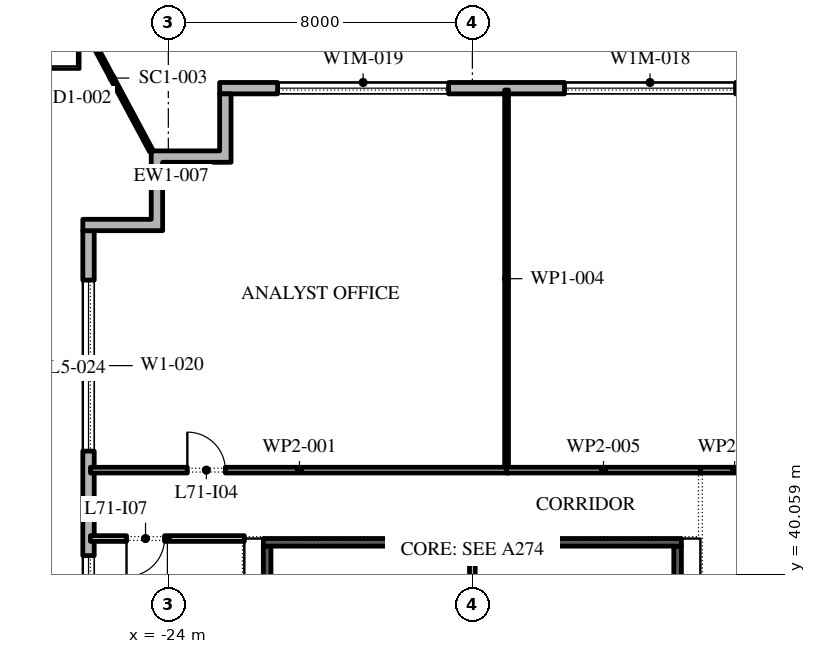
"""IFC4 building model, lengths in metres.
Left out: names, types, materials, properties, quantities, classifications, styles, units other than length and angle.
Written with IfcOpenShell. Run it as: python <this file> out.ifc"""

import sys

from ifc_helpers import new_model, si_unit, direction, frame, frame_2d, origin, place, context, subcontext, project, spatial, polyline, rectangle, outline, extrude, element, fill, save


model = new_model("IFC4")
c1 = context("Model", 3, precision=1e-05, world=origin(), true_north=direction((0.0, 1.0)))
c2 = subcontext(c1, "Body", "Model", "MODEL_VIEW")
j1 = project(units=[si_unit("LENGTHUNIT", "METRE"), si_unit("PLANEANGLEUNIT", "RADIAN")], contexts=[c1])
p1 = place(None, origin())
s1 = spatial("IfcSite", under=j1, at=p1, CompositionType="ELEMENT")
p2 = place(p1, origin())
s2 = spatial("IfcBuilding", under=s1, at=p2, CompositionType="ELEMENT")
p3 = place(p2, frame((0.0, 0.0, 325.8)))
s3 = spatial("IfcBuildingStorey", under=s2, at=p3, CompositionType="ELEMENT", Elevation=325.8)
p4 = place(p3, frame((22.35, 52.85, 0.0), z_axis=(0.0, 0.0, 1.0), x_axis=(-1.0, 0.0, 0.0)))
e1 = element("IfcWall", 1, at=p4, inside=s3, PredefinedType="STANDARD", context=c2, shape_type="SweptSolid", body=[
    extrude(rectangle(XDim=45.0, YDim=0.3, at=frame_2d((22.5, 0.0))), origin(), (0.0, 0.0, 1.0), 4.0),
])
p5 = place(p4, frame((1.375, 0.0, 0.45)))
e2 = element("IfcOpeningElement", 2, at=p5, cuts=e1, PredefinedType="OPENING", context=c2, shape_type="SweptSolid", body=[
    extrude(rectangle(XDim=4.5, YDim=2.575, at=frame_2d((2.25, 1.288))), frame((0.0, 0.16, 0.0), z_axis=(0.0, -1.0, 0.0), x_axis=(1.0, 0.0, 0.0)), (0.0, 0.0, 1.0), 0.32),
])
p6 = place(p4, frame((8.775, 0.0, 0.45)))
e3 = element("IfcOpeningElement", 3, at=p6, cuts=e1, PredefinedType="OPENING", context=c2, shape_type="SweptSolid", body=[
    extrude(rectangle(XDim=4.5, YDim=2.575, at=frame_2d((2.25, 1.288))), frame((0.0, 0.16, 0.0), z_axis=(0.0, -1.0, 0.0), x_axis=(1.0, 0.0, 0.0)), (0.0, 0.0, 1.0), 0.32),
])
p7 = place(p4, frame((17.375, 0.0, 0.0)))
e4 = element("IfcOpeningElement", 4, at=p7, cuts=e1, PredefinedType="OPENING", context=c2, shape_type="SweptSolid", body=[
    extrude(rectangle(XDim=2.4, YDim=3.025, at=frame_2d((1.2, 1.512))), frame((0.0, 0.16, 0.0), z_axis=(0.0, -1.0, 0.0), x_axis=(1.0, 0.0, 0.0)), (0.0, 0.0, 1.0), 0.32),
])
p8 = place(p4, frame((23.875, 0.0, 0.45)))
e5 = element("IfcOpeningElement", 5, at=p8, cuts=e1, PredefinedType="OPENING", context=c2, shape_type="SweptSolid", body=[
    extrude(rectangle(XDim=4.5, YDim=2.575, at=frame_2d((2.25, 1.288))), frame((0.0, 0.16, 0.0), z_axis=(0.0, -1.0, 0.0), x_axis=(1.0, 0.0, 0.0)), (0.0, 0.0, 1.0), 0.32),
])
p9 = place(p4, frame((31.425, 0.0, 0.45)))
e6 = element("IfcOpeningElement", 6, at=p9, cuts=e1, PredefinedType="OPENING", context=c2, shape_type="SweptSolid", body=[
    extrude(rectangle(XDim=4.5, YDim=2.575, at=frame_2d((2.25, 1.288))), frame((0.0, 0.16, 0.0), z_axis=(0.0, -1.0, 0.0), x_axis=(1.0, 0.0, 0.0)), (0.0, 0.0, 1.0), 0.32),
])
p10 = place(p4, frame((38.975, 0.0, 0.45)))
e7 = element("IfcOpeningElement", 7, at=p10, cuts=e1, PredefinedType="OPENING", context=c2, shape_type="SweptSolid", body=[
    extrude(rectangle(XDim=4.5, YDim=2.575, at=frame_2d((2.25, 1.288))), frame((0.0, 0.16, 0.0), z_axis=(0.0, -1.0, 0.0), x_axis=(1.0, 0.0, 0.0)), (0.0, 0.0, 1.0), 0.32),
])
p11 = place(p3, frame((-26.1, 49.1, 0.0), z_axis=(0.0, 0.0, 1.0), x_axis=(0.0, -1.0, 0.0)))
e8 = element("IfcWall", 8, at=p11, inside=s3, PredefinedType="STANDARD", context=c2, shape_type="SweptSolid", body=[
    extrude(rectangle(XDim=51.5, YDim=0.3, at=frame_2d((25.75, 0.0))), origin(), (0.0, 0.0, 1.0), 4.0),
])
p12 = place(p11, frame((1.3, 0.0, 0.45)))
e9 = element("IfcOpeningElement", 9, at=p12, cuts=e8, PredefinedType="OPENING", context=c2, shape_type="SweptSolid", body=[
    extrude(rectangle(XDim=4.5, YDim=3.05, at=frame_2d((2.25, 1.525))), frame((0.0, 0.16, 0.0), z_axis=(0.0, -1.0, 0.0), x_axis=(1.0, 0.0, 0.0)), (0.0, 0.0, 1.0), 0.32),
])
p13 = place(p11, frame((8.55, 0.0, 0.45)))
e10 = element("IfcOpeningElement", 10, at=p13, cuts=e8, PredefinedType="OPENING", context=c2, shape_type="SweptSolid", body=[
    extrude(rectangle(XDim=4.5, YDim=3.05, at=frame_2d((2.25, 1.525))), frame((0.0, 0.16, 0.0), z_axis=(0.0, -1.0, 0.0), x_axis=(1.0, 0.0, 0.0)), (0.0, 0.0, 1.0), 0.32),
])
p14 = place(p11, frame((17.0, 0.0, 0.0)))
e11 = element("IfcOpeningElement", 11, at=p14, cuts=e8, PredefinedType="OPENING", context=c2, shape_type="SweptSolid", body=[
    extrude(rectangle(XDim=2.4, YDim=3.5, at=frame_2d((1.2, 1.75))), frame((0.0, 0.16, 0.0), z_axis=(0.0, -1.0, 0.0), x_axis=(1.0, 0.0, 0.0)), (0.0, 0.0, 1.0), 0.32),
])
p15 = place(p11, frame((23.35, 0.0, 0.45)))
e12 = element("IfcOpeningElement", 12, at=p15, cuts=e8, PredefinedType="OPENING", context=c2, shape_type="SweptSolid", body=[
    extrude(rectangle(XDim=4.5, YDim=3.05, at=frame_2d((2.25, 1.525))), frame((0.0, 0.16, 0.0), z_axis=(0.0, -1.0, 0.0), x_axis=(1.0, 0.0, 0.0)), (0.0, 0.0, 1.0), 0.32),
])
p16 = place(p11, frame((30.75, 0.0, 0.45)))
e13 = element("IfcOpeningElement", 13, at=p16, cuts=e8, PredefinedType="OPENING", context=c2, shape_type="SweptSolid", body=[
    extrude(rectangle(XDim=4.5, YDim=3.05, at=frame_2d((2.25, 1.525))), frame((0.0, 0.16, 0.0), z_axis=(0.0, -1.0, 0.0), x_axis=(1.0, 0.0, 0.0)), (0.0, 0.0, 1.0), 0.32),
])
p17 = place(p11, frame((38.15, 0.0, 0.45)))
e14 = element("IfcOpeningElement", 14, at=p17, cuts=e8, PredefinedType="OPENING", context=c2, shape_type="SweptSolid", body=[
    extrude(rectangle(XDim=4.5, YDim=3.05, at=frame_2d((2.25, 1.525))), frame((0.0, 0.16, 0.0), z_axis=(0.0, -1.0, 0.0), x_axis=(1.0, 0.0, 0.0)), (0.0, 0.0, 1.0), 0.32),
])
p18 = place(p11, frame((46.6, 0.0, 0.0)))
e15 = element("IfcOpeningElement", 15, at=p18, cuts=e8, PredefinedType="OPENING", context=c2, shape_type="SweptSolid", body=[
    extrude(rectangle(XDim=2.4, YDim=3.5, at=frame_2d((1.2, 1.75))), frame((0.0, 0.16, 0.0), z_axis=(0.0, -1.0, 0.0), x_axis=(1.0, 0.0, 0.0)), (0.0, 0.0, 1.0), 0.32),
])
p19 = place(p3, origin())
e16 = element("IfcWall", 16, at=p19, inside=s3, PredefinedType="STANDARD", context=c2, shape_type="SweptSolid", body=[
    extrude(outline(polyline([(-24.45, 49.4), (-24.45, 51.2), (-22.65, 51.2), (-22.65, 52.7), (-22.35, 52.7), (-22.35, 50.9), (-24.15, 50.9), (-24.15, 49.1), (-26.25, 49.1), (-26.25, 49.4), (-24.45, 49.4)])), origin(), (0.0, 0.0, 1.0), 4.0),
])
p20 = place(p3, frame((-24.45, 51.2, -0.05), z_axis=(0.0, 0.0, 1.0), x_axis=(-0.472807073277, 0.881165972709, 0.0)))
e17 = element("IfcWall", 17, at=p20, inside=s3, PredefinedType="STANDARD", context=c2, shape_type="SweptSolid", body=[
    extrude(rectangle(XDim=4.349, YDim=0.1, at=frame_2d((2.174, 0.0))), origin(), (0.0, 0.0, 1.0), 4.05),
])
p21 = place(p3, frame((-21.4, 25.75, 0.0), z_axis=(0.0, 0.0, 1.0), x_axis=(0.0, 1.0, 0.0)))
e18 = element("IfcWall", 18, at=p21, inside=s3, PredefinedType="SHEAR", context=c2, shape_type="SweptSolid", body=[
    extrude(rectangle(XDim=15.05, YDim=0.2, at=frame_2d((7.525, 0.0))), origin(), (0.0, 0.0, 1.0), 4.0),
])
p22 = place(p21, frame((7.075, 0.0, 0.0)))
e19 = element("IfcOpeningElement", 19, at=p22, cuts=e18, PredefinedType="OPENING", context=c2, shape_type="SweptSolid", body=[
    extrude(rectangle(XDim=0.9, YDim=2.1, at=frame_2d((0.45, 1.05))), frame((0.0, 0.11, 0.0), z_axis=(0.0, -1.0, 0.0), x_axis=(1.0, 0.0, 0.0)), (0.0, 0.0, 1.0), 0.22),
])
p23 = place(p3, frame((-10.6, 25.75, 0.0), z_axis=(0.0, 0.0, 1.0), x_axis=(0.0, 1.0, 0.0)))
e20 = element("IfcWall", 20, at=p23, inside=s3, PredefinedType="SHEAR", context=c2, shape_type="SweptSolid", body=[
    extrude(rectangle(XDim=15.05, YDim=0.2, at=frame_2d((7.525, 0.0))), origin(), (0.0, 0.0, 1.0), 4.0),
])
p24 = place(p23, frame((7.075, 0.0, 0.0)))
e21 = element("IfcOpeningElement", 21, at=p24, cuts=e20, PredefinedType="OPENING", context=c2, shape_type="SweptSolid", body=[
    extrude(rectangle(XDim=0.9, YDim=2.1, at=frame_2d((0.45, 1.05))), frame((0.0, 0.11, 0.0), z_axis=(0.0, -1.0, 0.0), x_axis=(1.0, 0.0, 0.0)), (0.0, 0.0, 1.0), 0.22),
])
p25 = place(p3, frame((-21.5, 40.9, 0.0), z_axis=(0.0, 0.0, 1.0), x_axis=(1.0, 0.0, 0.0)))
e22 = element("IfcWall", 22, at=p25, inside=s3, PredefinedType="SHEAR", context=c2, shape_type="SweptSolid", body=[
    extrude(rectangle(XDim=11.0, YDim=0.2, at=frame_2d((5.5, 0.0))), origin(), (0.0, 0.0, 1.0), 4.0),
])
p26 = place(p3, frame((-16.0, 25.75, 0.0), z_axis=(0.0, 0.0, 1.0), x_axis=(0.0, 1.0, 0.0)))
e23 = element("IfcWall", 23, at=p26, inside=s3, PredefinedType="PARTITIONING", context=c2, shape_type="SweptSolid", body=[
    extrude(rectangle(XDim=15.05, YDim=0.15, at=frame_2d((7.525, 0.0))), origin(), (0.0, 0.0, 1.0), 4.0),
])
p27 = place(p3, frame((-26.05, 42.8, 0.0), z_axis=(0.0, 0.0, 1.0), x_axis=(1.0, 0.0, 0.0)))
e24 = element("IfcWall", 24, at=p27, inside=s3, PredefinedType="PARTITIONING", context=c2, shape_type="SweptSolid", body=[
    extrude(rectangle(XDim=11.0, YDim=0.15, at=frame_2d((5.5, 0.0))), origin(), (0.0, 0.0, 1.0), 4.0),
])
p28 = place(p27, frame((2.55, 0.0, 0.0)))
e25 = element("IfcOpeningElement", 25, at=p28, cuts=e24, PredefinedType="OPENING", context=c2, shape_type="SweptSolid", body=[
    extrude(rectangle(XDim=1.0, YDim=2.1, at=frame_2d((0.5, 1.05))), frame((0.0, 0.085, 0.0), z_axis=(0.0, -1.0, 0.0), x_axis=(1.0, 0.0, 0.0)), (0.0, 0.0, 1.0), 0.17),
])
p29 = place(p3, frame((-22.0, 41.0, 0.0), z_axis=(0.0, 0.0, 1.0), x_axis=(-1.0, 0.0, 0.0)))
e26 = element("IfcWall", 26, at=p29, inside=s3, PredefinedType="PARTITIONING", context=c2, shape_type="SweptSolid", body=[
    extrude(rectangle(XDim=4.05, YDim=0.15, at=frame_2d((2.025, 0.0))), origin(), (0.0, 0.0, 1.0), 4.0),
])
p30 = place(p29, frame((2.1, 0.0, 0.0)))
e27 = element("IfcOpeningElement", 27, at=p30, cuts=e26, PredefinedType="OPENING", context=c2, shape_type="SweptSolid", body=[
    extrude(rectangle(XDim=1.0, YDim=2.1, at=frame_2d((0.5, 1.05))), frame((0.0, 0.085, 0.0), z_axis=(0.0, -1.0, 0.0), x_axis=(1.0, 0.0, 0.0)), (0.0, 0.0, 1.0), 0.17),
])
p31 = place(p3, frame((-15.1, 42.875, 0.0), z_axis=(0.0, 0.0, 1.0), x_axis=(0.0, 1.0, 0.0)))
e28 = element("IfcWall", 28, at=p31, inside=s3, PredefinedType="PARTITIONING", context=c2, shape_type="SweptSolid", body=[
    extrude(rectangle(XDim=9.925, YDim=0.1, at=frame_2d((4.962, 0.0))), origin(), (0.0, 0.0, 1.0), 4.0),
])
p32 = place(p3, frame((-15.1, 42.8, 0.0), z_axis=(0.0, 0.0, 1.0), x_axis=(1.0, 0.0, 0.0)))
e29 = element("IfcWall", 29, at=p32, inside=s3, PredefinedType="PARTITIONING", context=c2, shape_type="SweptSolid", body=[
    extrude(rectangle(XDim=5.1, YDim=0.15, at=frame_2d((2.55, 0.0))), origin(), (0.0, 0.0, 1.0), 4.0),
])
p33 = place(p3, frame((-10.0, 42.8, 0.0), z_axis=(0.0, 0.0, 1.0), x_axis=(1.0, 0.0, 0.0)))
e30 = element("IfcWall", 30, at=p33, inside=s3, PredefinedType="PARTITIONING", context=c2, shape_type="SweptSolid", body=[
    extrude(rectangle(XDim=1.8, YDim=0.15, at=frame_2d((0.9, 0.0))), origin(), (0.0, 0.0, 1.0), 4.0),
])
p34 = place(p9, origin())
e31 = element("IfcWindow", 31, at=p34, inside=s3, PartitioningType="DOUBLE_PANEL_VERTICAL", PredefinedType="WINDOW", context=c2, shape_type="SweptSolid", body=[
    extrude(rectangle(XDim=4.5, YDim=2.575, at=frame_2d((2.25, 1.288))), frame((0.0, 0.03, 0.0), z_axis=(0.0, -1.0, 0.0), x_axis=(1.0, 0.0, 0.0)), (0.0, 0.0, 1.0), 0.06),
])
fill(e6, e31)
p35 = place(p10, origin())
e32 = element("IfcWindow", 32, at=p35, inside=s3, PartitioningType="DOUBLE_PANEL_VERTICAL", PredefinedType="WINDOW", context=c2, shape_type="SweptSolid", body=[
    extrude(rectangle(XDim=4.5, YDim=2.575, at=frame_2d((2.25, 1.288))), frame((0.0, 0.03, 0.0), z_axis=(0.0, -1.0, 0.0), x_axis=(1.0, 0.0, 0.0)), (0.0, 0.0, 1.0), 0.06),
])
fill(e7, e32)
p36 = place(p12, origin())
e33 = element("IfcWindow", 33, at=p36, inside=s3, PartitioningType="DOUBLE_PANEL_VERTICAL", PredefinedType="WINDOW", context=c2, shape_type="SweptSolid", body=[
    extrude(rectangle(XDim=4.5, YDim=3.05, at=frame_2d((2.25, 1.525))), frame((0.0, 0.03, 0.0), z_axis=(0.0, -1.0, 0.0), x_axis=(1.0, 0.0, 0.0)), (0.0, 0.0, 1.0), 0.06),
])
fill(e9, e33)
p37 = place(p13, origin())
e34 = element("IfcWindow", 34, at=p37, inside=s3, PartitioningType="DOUBLE_PANEL_VERTICAL", PredefinedType="WINDOW", context=c2, shape_type="SweptSolid", body=[
    extrude(rectangle(XDim=4.5, YDim=3.05, at=frame_2d((2.25, 1.525))), frame((0.0, 0.03, 0.0), z_axis=(0.0, -1.0, 0.0), x_axis=(1.0, 0.0, 0.0)), (0.0, 0.0, 1.0), 0.06),
])
fill(e10, e34)
p38 = place(p28, origin())
e35 = element("IfcDoor", 35, at=p38, inside=s3, OperationType="SINGLE_SWING_RIGHT", PredefinedType="DOOR", context=c2, shape_type="SweptSolid", body=[
    extrude(rectangle(XDim=1.0, YDim=2.1, at=frame_2d((0.5, 1.05))), frame((0.0, 0.025, 0.0), z_axis=(0.0, -1.0, 0.0), x_axis=(1.0, 0.0, 0.0)), (0.0, 0.0, 1.0), 0.05),
])
fill(e25, e35)
p39 = place(p30, origin())
e36 = element("IfcDoor", 36, at=p39, inside=s3, OperationType="SINGLE_SWING_LEFT", PredefinedType="DOOR", context=c2, shape_type="SweptSolid", body=[
    extrude(rectangle(XDim=1.0, YDim=2.1, at=frame_2d((0.5, 1.05))), frame((0.0, 0.025, 0.0), z_axis=(0.0, -1.0, 0.0), x_axis=(1.0, 0.0, 0.0)), (0.0, 0.0, 1.0), 0.05),
])
fill(e27, e36)
save(model, sys.argv[1])
